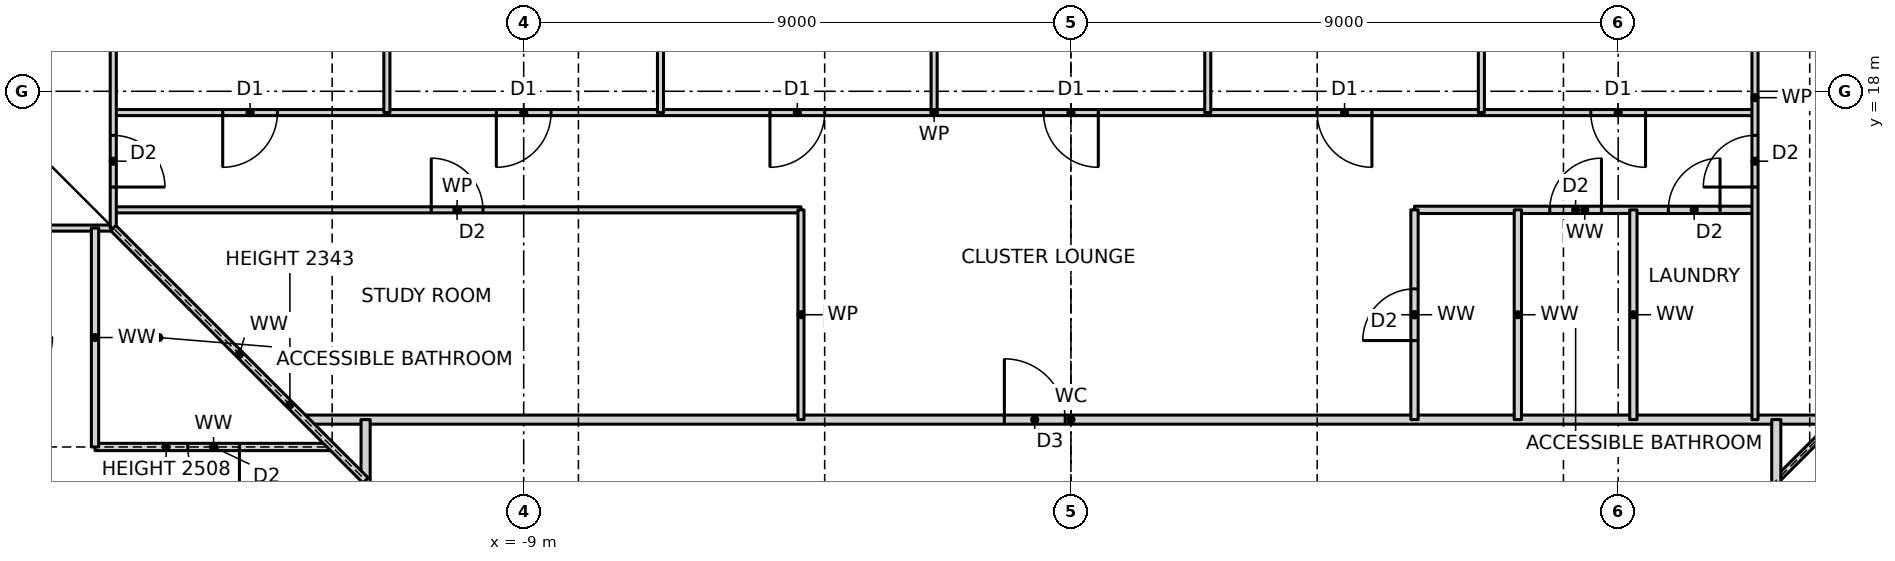
"""IFC4 building model, lengths in metres.
Left out: names, types, materials, properties, quantities, classifications, styles, units other than length and angle.
Written with IfcOpenShell. Run it as: python <this file> out.ifc"""

import sys

from ifc_helpers import new_model, si_unit, direction, frame, frame_2d, origin, place, context, subcontext, project, spatial, rectangle, extrude, element, fill, save


model = new_model("IFC4")
c1 = context("Model", 3, precision=1e-05, world=origin(), true_north=direction((0.0, 1.0)))
c2 = subcontext(c1, "Body", "Model", "MODEL_VIEW")
j1 = project(units=[si_unit("LENGTHUNIT", "METRE"), si_unit("PLANEANGLEUNIT", "RADIAN")], contexts=[c1])
p1 = place(None, origin())
s1 = spatial("IfcSite", under=j1, at=p1, CompositionType="ELEMENT")
p2 = place(p1, origin())
s2 = spatial("IfcBuilding", under=s1, at=p2, CompositionType="ELEMENT")
p3 = place(p2, frame((0.0, 0.0, 60.5)))
s3 = spatial("IfcBuildingStorey", under=s2, at=p3, CompositionType="ELEMENT", Elevation=60.5)
p4 = place(p3, frame((-16.05, 12.15, 0.0), z_axis=(0.0, 0.0, 1.0), x_axis=(1.0, 0.0, 0.0)))
e1 = element("IfcWall", 1, at=p4, inside=s3, PredefinedType="PARTITIONING", context=c2, shape_type="SweptSolid", body=[
    extrude(rectangle(XDim=3.9, YDim=0.12, at=frame_2d((1.95, 0.0))), origin(), (0.0, 0.0, 1.0), 2.508),
])
p5 = place(p4, frame((1.525, 0.0, 0.0)))
e2 = element("IfcOpeningElement", 2, at=p5, cuts=e1, PredefinedType="OPENING", context=c2, shape_type="SweptSolid", body=[
    extrude(rectangle(XDim=0.85, YDim=2.1, at=frame_2d((0.425, 1.05))), frame((0.0, 0.07, 0.0), z_axis=(0.0, -1.0, 0.0), x_axis=(1.0, 0.0, 0.0)), (0.0, 0.0, 1.0), 0.14),
])
p6 = place(p3, frame((-12.6, 12.6, 0.0), z_axis=(0.0, 0.0, 1.0), x_axis=(1.0, 0.0, 0.0)))
e3 = element("IfcWall", 3, at=p6, inside=s3, PredefinedType="PARTITIONING", context=c2, shape_type="SweptSolid", body=[
    extrude(rectangle(XDim=25.2, YDim=0.15, at=frame_2d((12.6, 0.0))), origin(), (0.0, 0.0, 1.0), 3.27),
])
p7 = place(p6, frame((11.505, 0.0, 0.0)))
e4 = element("IfcOpeningElement", 4, at=p7, cuts=e3, PredefinedType="OPENING", context=c2, shape_type="SweptSolid", body=[
    extrude(rectangle(XDim=1.0, YDim=2.1, at=frame_2d((0.5, 1.05))), frame((0.0, 0.085, 0.0), z_axis=(0.0, -1.0, 0.0), x_axis=(1.0, 0.0, 0.0)), (0.0, 0.0, 1.0), 0.17),
])
p8 = place(p3, frame((-23.19, 15.75, 0.0), z_axis=(0.0, 0.0, 1.0), x_axis=(1.0, 0.0, 0.0)))
e5 = element("IfcWall", 5, at=p8, inside=s3, PredefinedType="PARTITIONING", context=c2, shape_type="SweptSolid", body=[
    extrude(rectangle(XDim=7.44, YDim=0.1, at=frame_2d((3.72, 0.0))), origin(), (0.0, 0.0, 1.0), 3.27),
])
p9 = place(p3, frame((-15.75, 16.05, 0.0), z_axis=(0.0, 0.0, 1.0), x_axis=(1.0, 0.0, 0.0)))
e6 = element("IfcWall", 6, at=p9, inside=s3, PredefinedType="PARTITIONING", context=c2, shape_type="SweptSolid", body=[
    extrude(rectangle(XDim=11.31, YDim=0.1, at=frame_2d((5.655, 0.0))), origin(), (0.0, 0.0, 1.0), 3.27),
])
p10 = place(p9, frame((5.23, 0.0, 0.0)))
e7 = element("IfcOpeningElement", 7, at=p10, cuts=e6, PredefinedType="OPENING", context=c2, shape_type="SweptSolid", body=[
    extrude(rectangle(XDim=0.85, YDim=2.1, at=frame_2d((0.425, 1.05))), frame((0.0, 0.06, 0.0), z_axis=(0.0, -1.0, 0.0), x_axis=(1.0, 0.0, 0.0)), (0.0, 0.0, 1.0), 0.12),
])
p11 = place(p3, frame((5.65, 16.05, 0.0), z_axis=(0.0, 0.0, 1.0), x_axis=(1.0, 0.0, 0.0)))
e8 = element("IfcWall", 8, at=p11, inside=s3, PredefinedType="PARTITIONING", context=c2, shape_type="SweptSolid", body=[
    extrude(rectangle(XDim=5.6, YDim=0.12, at=frame_2d((2.8, 0.0))), origin(), (0.0, 0.0, 1.0), 3.27),
])
p12 = place(p11, frame((4.175, 0.0, 0.0)))
e9 = element("IfcOpeningElement", 9, at=p12, cuts=e8, PredefinedType="OPENING", context=c2, shape_type="SweptSolid", body=[
    extrude(rectangle(XDim=0.85, YDim=2.1, at=frame_2d((0.425, 1.05))), frame((0.0, 0.07, 0.0), z_axis=(0.0, -1.0, 0.0), x_axis=(1.0, 0.0, 0.0)), (0.0, 0.0, 1.0), 0.14),
])
p13 = place(p11, frame((2.225, 0.0, 0.0)))
e10 = element("IfcOpeningElement", 10, at=p13, cuts=e8, PredefinedType="OPENING", context=c2, shape_type="SweptSolid", body=[
    extrude(rectangle(XDim=0.85, YDim=2.1, at=frame_2d((0.425, 1.05))), frame((0.0, 0.07, 0.0), z_axis=(0.0, -1.0, 0.0), x_axis=(1.0, 0.0, 0.0)), (0.0, 0.0, 1.0), 0.14),
])
p14 = place(p3, frame((-15.75, 17.65, 0.0), z_axis=(0.0, 0.0, 1.0), x_axis=(1.0, 0.0, 0.0)))
e11 = element("IfcWall", 11, at=p14, inside=s3, PredefinedType="PARTITIONING", context=c2, shape_type="SweptSolid", body=[
    extrude(rectangle(XDim=27.0, YDim=0.1, at=frame_2d((13.5, 0.0))), origin(), (0.0, 0.0, 1.0), 3.27),
])
p15 = place(p14, frame((24.3, 0.0, 0.0)))
e12 = element("IfcOpeningElement", 12, at=p15, cuts=e11, PredefinedType="OPENING", context=c2, shape_type="SweptSolid", body=[
    extrude(rectangle(XDim=0.9, YDim=2.1, at=frame_2d((0.45, 1.05))), frame((0.0, 0.06, 0.0), z_axis=(0.0, -1.0, 0.0), x_axis=(1.0, 0.0, 0.0)), (0.0, 0.0, 1.0), 0.12),
])
p16 = place(p14, frame((19.8, 0.0, 0.0)))
e13 = element("IfcOpeningElement", 13, at=p16, cuts=e11, PredefinedType="OPENING", context=c2, shape_type="SweptSolid", body=[
    extrude(rectangle(XDim=0.9, YDim=2.1, at=frame_2d((0.45, 1.05))), frame((0.0, 0.06, 0.0), z_axis=(0.0, -1.0, 0.0), x_axis=(1.0, 0.0, 0.0)), (0.0, 0.0, 1.0), 0.12),
])
p17 = place(p14, frame((15.3, 0.0, 0.0)))
e14 = element("IfcOpeningElement", 14, at=p17, cuts=e11, PredefinedType="OPENING", context=c2, shape_type="SweptSolid", body=[
    extrude(rectangle(XDim=0.9, YDim=2.1, at=frame_2d((0.45, 1.05))), frame((0.0, 0.06, 0.0), z_axis=(0.0, -1.0, 0.0), x_axis=(1.0, 0.0, 0.0)), (0.0, 0.0, 1.0), 0.12),
])
p18 = place(p14, frame((10.8, 0.0, 0.0)))
e15 = element("IfcOpeningElement", 15, at=p18, cuts=e11, PredefinedType="OPENING", context=c2, shape_type="SweptSolid", body=[
    extrude(rectangle(XDim=0.9, YDim=2.1, at=frame_2d((0.45, 1.05))), frame((0.0, 0.06, 0.0), z_axis=(0.0, -1.0, 0.0), x_axis=(1.0, 0.0, 0.0)), (0.0, 0.0, 1.0), 0.12),
])
p19 = place(p14, frame((6.3, 0.0, 0.0)))
e16 = element("IfcOpeningElement", 16, at=p19, cuts=e11, PredefinedType="OPENING", context=c2, shape_type="SweptSolid", body=[
    extrude(rectangle(XDim=0.9, YDim=2.1, at=frame_2d((0.45, 1.05))), frame((0.0, 0.06, 0.0), z_axis=(0.0, -1.0, 0.0), x_axis=(1.0, 0.0, 0.0)), (0.0, 0.0, 1.0), 0.12),
])
p20 = place(p14, frame((1.8, 0.0, 0.0)))
e17 = element("IfcOpeningElement", 17, at=p20, cuts=e11, PredefinedType="OPENING", context=c2, shape_type="SweptSolid", body=[
    extrude(rectangle(XDim=0.9, YDim=2.1, at=frame_2d((0.45, 1.05))), frame((0.0, 0.06, 0.0), z_axis=(0.0, -1.0, 0.0), x_axis=(1.0, 0.0, 0.0)), (0.0, 0.0, 1.0), 0.12),
])
p21 = place(p3, frame((11.6, 11.6, 0.0), z_axis=(0.0, 0.0, 1.0), x_axis=(0.707106781187, 0.707106781187, 0.0)))
e18 = element("IfcWall", 18, at=p21, inside=s3, PredefinedType="PARTITIONING", context=c2, shape_type="SweptSolid", body=[
    extrude(rectangle(XDim=5.869, YDim=0.1, at=frame_2d((2.935, 0.0))), origin(), (0.0, 0.0, 1.0), 2.343),
])
p22 = place(p3, frame((11.6, -11.6, 0.0), z_axis=(0.0, 0.0, 1.0), x_axis=(0.0, 1.0, 0.0)))
e19 = element("IfcWall", 19, at=p22, inside=s3, PredefinedType="PARTITIONING", context=c2, shape_type="SweptSolid", body=[
    extrude(rectangle(XDim=24.2, YDim=0.15, at=frame_2d((12.1, 0.0))), origin(), (0.0, 0.0, 1.0), 3.27),
])
p23 = place(p22, frame((16.05, 0.0, 0.0)))
e20 = element("IfcOpeningElement", 20, at=p23, cuts=e19, PredefinedType="OPENING", context=c2, shape_type="SweptSolid", body=[
    extrude(rectangle(XDim=1.0, YDim=2.1, at=frame_2d((0.5, 1.05))), frame((0.0, 0.085, 0.0), z_axis=(0.0, -1.0, 0.0), x_axis=(1.0, 0.0, 0.0)), (0.0, 0.0, 1.0), 0.17),
])
p24 = place(p3, frame((11.25, 12.6, 0.0), z_axis=(0.0, 0.0, 1.0), x_axis=(0.0, 1.0, 0.0)))
e21 = element("IfcWall", 21, at=p24, inside=s3, PredefinedType="PARTITIONING", context=c2, shape_type="SweptSolid", body=[
    extrude(rectangle(XDim=10.59, YDim=0.1, at=frame_2d((5.295, 0.0))), origin(), (0.0, 0.0, 1.0), 3.27),
])
p25 = place(p24, frame((3.825, 0.0, 0.0)))
e22 = element("IfcOpeningElement", 22, at=p25, cuts=e21, PredefinedType="OPENING", context=c2, shape_type="SweptSolid", body=[
    extrude(rectangle(XDim=0.85, YDim=2.1, at=frame_2d((0.425, 1.05))), frame((0.0, 0.06, 0.0), z_axis=(0.0, -1.0, 0.0), x_axis=(1.0, 0.0, 0.0)), (0.0, 0.0, 1.0), 0.12),
])
for number, where, z_axis, x_axis in (
    (23, (9.25, 12.6, 0.0), (0.0, 0.0, 1.0), (0.0, 1.0, 0.0)),
    (24, (7.35, 12.6, 0.0), (0.0, 0.0, 1.0), (0.0, 1.0, 0.0)),
):
    element("IfcWall", number, at=place(p3, frame(where, z_axis=z_axis, x_axis=x_axis)), inside=s3, PredefinedType="PARTITIONING", context=c2, shape_type="SweptSolid", body=[
        extrude(rectangle(XDim=3.45, YDim=0.12, at=frame_2d((1.725, 0.0))), origin(), (0.0, 0.0, 1.0), 3.27),
    ])
p26 = place(p3, frame((6.75, 17.65, 0.0), z_axis=(0.0, 0.0, 1.0), x_axis=(0.0, 1.0, 0.0)))
e25 = element("IfcWall", 25, at=p26, inside=s3, PredefinedType="PARTITIONING", context=c2, shape_type="SweptSolid", body=[
    extrude(rectangle(XDim=5.54, YDim=0.1, at=frame_2d((2.77, 0.0))), origin(), (0.0, 0.0, 1.0), 3.27),
])
p27 = place(p3, frame((5.65, 12.6, 0.0), z_axis=(0.0, 0.0, 1.0), x_axis=(0.0, 1.0, 0.0)))
e26 = element("IfcWall", 26, at=p27, inside=s3, PredefinedType="PARTITIONING", context=c2, shape_type="SweptSolid", body=[
    extrude(rectangle(XDim=3.45, YDim=0.12, at=frame_2d((1.725, 0.0))), origin(), (0.0, 0.0, 1.0), 3.27),
])
p28 = place(p27, frame((1.3, 0.0, 0.0)))
e27 = element("IfcOpeningElement", 27, at=p28, cuts=e26, PredefinedType="OPENING", context=c2, shape_type="SweptSolid", body=[
    extrude(rectangle(XDim=0.85, YDim=2.1, at=frame_2d((0.425, 1.05))), frame((0.0, 0.07, 0.0), z_axis=(0.0, -1.0, 0.0), x_axis=(1.0, 0.0, 0.0)), (0.0, 0.0, 1.0), 0.14),
])
for number, where, z_axis, x_axis in (
    (28, (2.25, 17.65, 0.0), (0.0, 0.0, 1.0), (0.0, 1.0, 0.0)),
    (29, (-2.25, 17.65, 0.0), (0.0, 0.0, 1.0), (0.0, 1.0, 0.0)),
):
    element("IfcWall", number, at=place(p3, frame(where, z_axis=z_axis, x_axis=x_axis)), inside=s3, PredefinedType="PARTITIONING", context=c2, shape_type="SweptSolid", body=[
        extrude(rectangle(XDim=5.54, YDim=0.1, at=frame_2d((2.77, 0.0))), origin(), (0.0, 0.0, 1.0), 3.27),
    ])
p29 = place(p3, frame((-4.44, 12.6, 0.0), z_axis=(0.0, 0.0, 1.0), x_axis=(0.0, 1.0, 0.0)))
e30 = element("IfcWall", 30, at=p29, inside=s3, PredefinedType="PARTITIONING", context=c2, shape_type="SweptSolid", body=[
    extrude(rectangle(XDim=3.45, YDim=0.1, at=frame_2d((1.725, 0.0))), origin(), (0.0, 0.0, 1.0), 3.27),
])
for number, where, z_axis, x_axis in (
    (31, (-6.75, 17.65, 0.0), (0.0, 0.0, 1.0), (0.0, 1.0, 0.0)),
    (32, (-11.25, 17.65, 0.0), (0.0, 0.0, 1.0), (0.0, 1.0, 0.0)),
):
    element("IfcWall", number, at=place(p3, frame(where, z_axis=z_axis, x_axis=x_axis)), inside=s3, PredefinedType="PARTITIONING", context=c2, shape_type="SweptSolid", body=[
        extrude(rectangle(XDim=5.54, YDim=0.1, at=frame_2d((2.77, 0.0))), origin(), (0.0, 0.0, 1.0), 3.27),
    ])
p30 = place(p3, frame((-11.6, -11.6, 0.0), z_axis=(0.0, 0.0, 1.0), x_axis=(0.0, 1.0, 0.0)))
e33 = element("IfcWall", 33, at=p30, inside=s3, PredefinedType="PARTITIONING", context=c2, shape_type="SweptSolid", body=[
    extrude(rectangle(XDim=24.2, YDim=0.15, at=frame_2d((12.1, 0.0))), origin(), (0.0, 0.0, 1.0), 3.27),
])
p31 = place(p30, frame((19.225, 0.0, 0.0)))
e34 = element("IfcOpeningElement", 34, at=p31, cuts=e33, PredefinedType="OPENING", context=c2, shape_type="SweptSolid", body=[
    extrude(rectangle(XDim=1.0, YDim=2.1, at=frame_2d((0.5, 1.05))), frame((0.0, 0.085, 0.0), z_axis=(0.0, -1.0, 0.0), x_axis=(1.0, 0.0, 0.0)), (0.0, 0.0, 1.0), 0.17),
])
p32 = place(p30, frame((3.425, 0.0, 0.0)))
e35 = element("IfcOpeningElement", 35, at=p32, cuts=e33, PredefinedType="OPENING", context=c2, shape_type="SweptSolid", body=[
    extrude(rectangle(XDim=1.0, YDim=2.1, at=frame_2d((0.5, 1.05))), frame((0.0, 0.085, 0.0), z_axis=(0.0, -1.0, 0.0), x_axis=(1.0, 0.0, 0.0)), (0.0, 0.0, 1.0), 0.17),
])
p33 = place(p3, frame((-15.75, 15.75, 0.0), z_axis=(0.0, 0.0, 1.0), x_axis=(0.0, 1.0, 0.0)))
e36 = element("IfcWall", 36, at=p33, inside=s3, PredefinedType="PARTITIONING", context=c2, shape_type="SweptSolid", body=[
    extrude(rectangle(XDim=7.44, YDim=0.1, at=frame_2d((3.72, 0.0))), origin(), (0.0, 0.0, 1.0), 3.27),
])
p34 = place(p33, frame((0.675, 0.0, 0.0)))
e37 = element("IfcOpeningElement", 37, at=p34, cuts=e36, PredefinedType="OPENING", context=c2, shape_type="SweptSolid", body=[
    extrude(rectangle(XDim=0.85, YDim=2.1, at=frame_2d((0.425, 1.05))), frame((0.0, 0.06, 0.0), z_axis=(0.0, -1.0, 0.0), x_axis=(1.0, 0.0, 0.0)), (0.0, 0.0, 1.0), 0.12),
])
p35 = place(p3, frame((-16.05, 12.15, 0.0), z_axis=(0.0, 0.0, 1.0), x_axis=(0.0, 1.0, 0.0)))
e38 = element("IfcWall", 38, at=p35, inside=s3, PredefinedType="PARTITIONING", context=c2, shape_type="SweptSolid", body=[
    extrude(rectangle(XDim=3.6, YDim=0.12, at=frame_2d((1.8, 0.0))), origin(), (0.0, 0.0, 1.0), 3.27),
])
p36 = place(p3, frame((-11.6, 11.6, 0.0), z_axis=(0.0, 0.0, 1.0), x_axis=(-0.707106781187, 0.707106781187, 0.0)))
e39 = element("IfcWall", 39, at=p36, inside=s3, PredefinedType="PARTITIONING", context=c2, shape_type="SweptSolid", body=[
    extrude(rectangle(XDim=5.869, YDim=0.12, at=frame_2d((2.935, 0.0))), origin(), (0.0, 0.0, 1.0), 2.343),
])
p37 = place(p25, origin())
e40 = element("IfcDoor", 40, at=p37, inside=s3, OperationType="SINGLE_SWING_LEFT", PredefinedType="DOOR", context=c2, shape_type="SweptSolid", body=[
    extrude(rectangle(XDim=0.85, YDim=2.1, at=frame_2d((0.425, 1.05))), frame((0.0, 0.025, 0.0), z_axis=(0.0, -1.0, 0.0), x_axis=(1.0, 0.0, 0.0)), (0.0, 0.0, 1.0), 0.05),
])
fill(e22, e40)
p38 = place(p15, frame((0.9, 0.0, 0.0), z_axis=(0.0, 0.0, 1.0), x_axis=(-1.0, 0.0, 0.0)))
e41 = element("IfcDoor", 41, at=p38, inside=s3, OperationType="SINGLE_SWING_LEFT", PredefinedType="DOOR", context=c2, shape_type="SweptSolid", body=[
    extrude(rectangle(XDim=0.9, YDim=2.1, at=frame_2d((0.45, 1.05))), frame((0.0, 0.025, 0.0), z_axis=(0.0, -1.0, 0.0), x_axis=(1.0, 0.0, 0.0)), (0.0, 0.0, 1.0), 0.05),
])
fill(e12, e41)
p39 = place(p16, frame((0.9, 0.0, 0.0), z_axis=(0.0, 0.0, 1.0), x_axis=(-1.0, 0.0, 0.0)))
e42 = element("IfcDoor", 42, at=p39, inside=s3, OperationType="SINGLE_SWING_LEFT", PredefinedType="DOOR", context=c2, shape_type="SweptSolid", body=[
    extrude(rectangle(XDim=0.9, YDim=2.1, at=frame_2d((0.45, 1.05))), frame((0.0, 0.025, 0.0), z_axis=(0.0, -1.0, 0.0), x_axis=(1.0, 0.0, 0.0)), (0.0, 0.0, 1.0), 0.05),
])
fill(e13, e42)
p40 = place(p17, frame((0.9, 0.0, 0.0), z_axis=(0.0, 0.0, 1.0), x_axis=(-1.0, 0.0, 0.0)))
e43 = element("IfcDoor", 43, at=p40, inside=s3, OperationType="SINGLE_SWING_LEFT", PredefinedType="DOOR", context=c2, shape_type="SweptSolid", body=[
    extrude(rectangle(XDim=0.9, YDim=2.1, at=frame_2d((0.45, 1.05))), frame((0.0, 0.025, 0.0), z_axis=(0.0, -1.0, 0.0), x_axis=(1.0, 0.0, 0.0)), (0.0, 0.0, 1.0), 0.05),
])
fill(e14, e43)
p41 = place(p18, frame((0.9, 0.0, 0.0), z_axis=(0.0, 0.0, 1.0), x_axis=(-1.0, 0.0, 0.0)))
e44 = element("IfcDoor", 44, at=p41, inside=s3, OperationType="SINGLE_SWING_RIGHT", PredefinedType="DOOR", context=c2, shape_type="SweptSolid", body=[
    extrude(rectangle(XDim=0.9, YDim=2.1, at=frame_2d((0.45, 1.05))), frame((0.0, 0.025, 0.0), z_axis=(0.0, -1.0, 0.0), x_axis=(1.0, 0.0, 0.0)), (0.0, 0.0, 1.0), 0.05),
])
fill(e15, e44)
p42 = place(p19, frame((0.9, 0.0, 0.0), z_axis=(0.0, 0.0, 1.0), x_axis=(-1.0, 0.0, 0.0)))
e45 = element("IfcDoor", 45, at=p42, inside=s3, OperationType="SINGLE_SWING_RIGHT", PredefinedType="DOOR", context=c2, shape_type="SweptSolid", body=[
    extrude(rectangle(XDim=0.9, YDim=2.1, at=frame_2d((0.45, 1.05))), frame((0.0, 0.025, 0.0), z_axis=(0.0, -1.0, 0.0), x_axis=(1.0, 0.0, 0.0)), (0.0, 0.0, 1.0), 0.05),
])
fill(e16, e45)
p43 = place(p20, frame((0.9, 0.0, 0.0), z_axis=(0.0, 0.0, 1.0), x_axis=(-1.0, 0.0, 0.0)))
e46 = element("IfcDoor", 46, at=p43, inside=s3, OperationType="SINGLE_SWING_RIGHT", PredefinedType="DOOR", context=c2, shape_type="SweptSolid", body=[
    extrude(rectangle(XDim=0.9, YDim=2.1, at=frame_2d((0.45, 1.05))), frame((0.0, 0.025, 0.0), z_axis=(0.0, -1.0, 0.0), x_axis=(1.0, 0.0, 0.0)), (0.0, 0.0, 1.0), 0.05),
])
fill(e17, e46)
p44 = place(p7, origin())
e47 = element("IfcDoor", 47, at=p44, inside=s3, OperationType="SINGLE_SWING_LEFT", PredefinedType="DOOR", context=c2, shape_type="SweptSolid", body=[
    extrude(rectangle(XDim=1.0, YDim=2.1, at=frame_2d((0.5, 1.05))), frame((0.0, 0.025, 0.0), z_axis=(0.0, -1.0, 0.0), x_axis=(1.0, 0.0, 0.0)), (0.0, 0.0, 1.0), 0.05),
])
fill(e4, e47)
p45 = place(p12, origin())
e48 = element("IfcDoor", 48, at=p45, inside=s3, OperationType="SINGLE_SWING_RIGHT", PredefinedType="DOOR", context=c2, shape_type="SweptSolid", body=[
    extrude(rectangle(XDim=0.85, YDim=2.1, at=frame_2d((0.425, 1.05))), frame((0.0, 0.025, 0.0), z_axis=(0.0, -1.0, 0.0), x_axis=(1.0, 0.0, 0.0)), (0.0, 0.0, 1.0), 0.05),
])
fill(e9, e48)
p46 = place(p13, origin())
e49 = element("IfcDoor", 49, at=p46, inside=s3, OperationType="SINGLE_SWING_RIGHT", PredefinedType="DOOR", context=c2, shape_type="SweptSolid", body=[
    extrude(rectangle(XDim=0.85, YDim=2.1, at=frame_2d((0.425, 1.05))), frame((0.0, 0.025, 0.0), z_axis=(0.0, -1.0, 0.0), x_axis=(1.0, 0.0, 0.0)), (0.0, 0.0, 1.0), 0.05),
])
fill(e10, e49)
p47 = place(p28, origin())
e50 = element("IfcDoor", 50, at=p47, inside=s3, OperationType="SINGLE_SWING_LEFT", PredefinedType="DOOR", context=c2, shape_type="SweptSolid", body=[
    extrude(rectangle(XDim=0.85, YDim=2.1, at=frame_2d((0.425, 1.05))), frame((0.0, 0.025, 0.0), z_axis=(0.0, -1.0, 0.0), x_axis=(1.0, 0.0, 0.0)), (0.0, 0.0, 1.0), 0.05),
])
fill(e27, e50)
p48 = place(p10, origin())
e51 = element("IfcDoor", 51, at=p48, inside=s3, OperationType="SINGLE_SWING_LEFT", PredefinedType="DOOR", context=c2, shape_type="SweptSolid", body=[
    extrude(rectangle(XDim=0.85, YDim=2.1, at=frame_2d((0.425, 1.05))), frame((0.0, 0.025, 0.0), z_axis=(0.0, -1.0, 0.0), x_axis=(1.0, 0.0, 0.0)), (0.0, 0.0, 1.0), 0.05),
])
fill(e7, e51)
p49 = place(p5, frame((0.85, 0.0, 0.0), z_axis=(0.0, 0.0, 1.0), x_axis=(-1.0, 0.0, 0.0)))
e52 = element("IfcDoor", 52, at=p49, inside=s3, OperationType="SINGLE_SWING_LEFT", PredefinedType="DOOR", context=c2, shape_type="SweptSolid", body=[
    extrude(rectangle(XDim=0.85, YDim=2.1, at=frame_2d((0.425, 1.05))), frame((0.0, 0.025, 0.0), z_axis=(0.0, -1.0, 0.0), x_axis=(1.0, 0.0, 0.0)), (0.0, 0.0, 1.0), 0.05),
])
fill(e2, e52)
p50 = place(p34, frame((0.85, 0.0, 0.0), z_axis=(0.0, 0.0, 1.0), x_axis=(-1.0, 0.0, 0.0)))
e53 = element("IfcDoor", 53, at=p50, inside=s3, OperationType="SINGLE_SWING_RIGHT", PredefinedType="DOOR", context=c2, shape_type="SweptSolid", body=[
    extrude(rectangle(XDim=0.85, YDim=2.1, at=frame_2d((0.425, 1.05))), frame((0.0, 0.025, 0.0), z_axis=(0.0, -1.0, 0.0), x_axis=(1.0, 0.0, 0.0)), (0.0, 0.0, 1.0), 0.05),
])
fill(e37, e53)
save(model, sys.argv[1])
